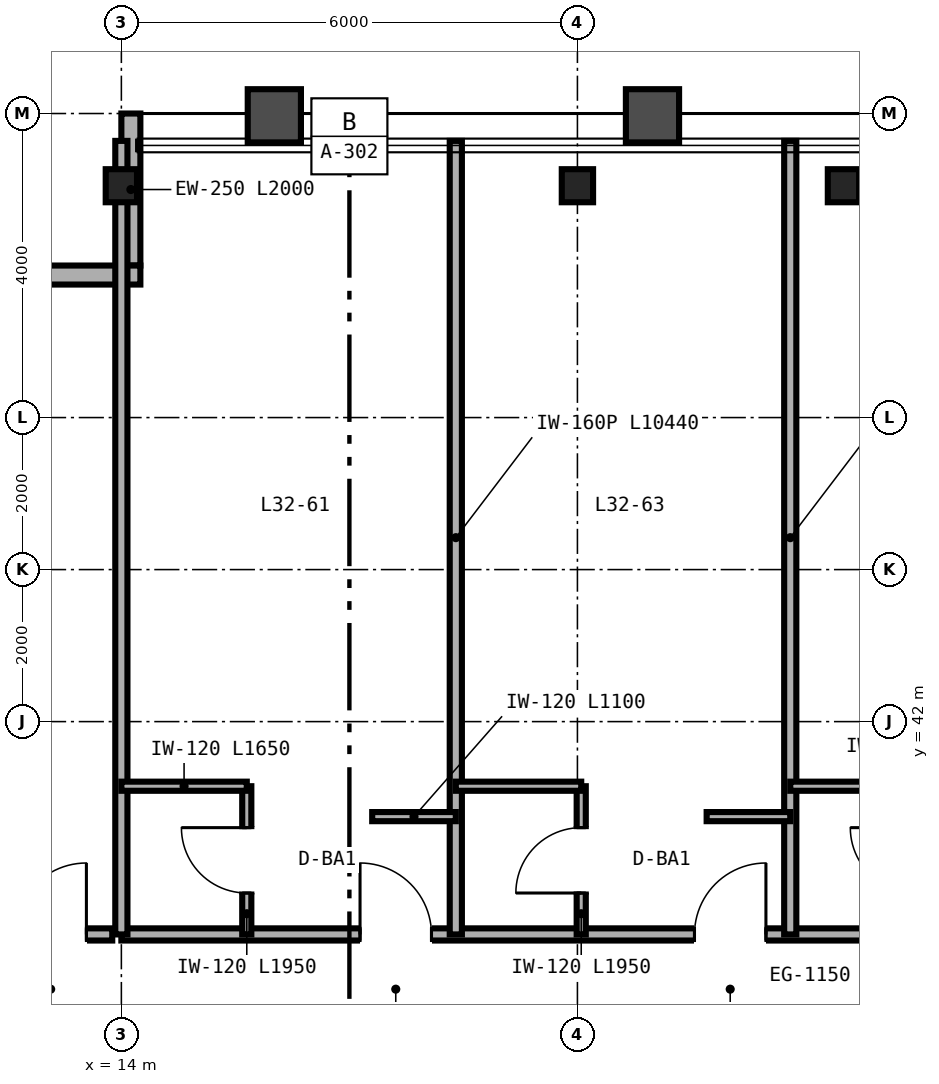
"""IFC4 building model, lengths in metres.
Left out: names, types, materials, properties, quantities, classifications, styles, units other than length and angle.
Written with IfcOpenShell. Run it as: python <this file> out.ifc"""

import sys

from ifc_helpers import new_model, si_unit, direction, frame, frame_2d, origin, origin_2d, place, context, subcontext, project, spatial, rectangle, i_section, extrude, source, transform, mapped, element, fill, save


model = new_model("IFC4")
c1 = context("Model", 3, precision=1e-05, world=origin(), true_north=direction((0.0, 1.0)))
c2 = subcontext(c1, "Body", "Model", "MODEL_VIEW")
j1 = project(units=[si_unit("LENGTHUNIT", "METRE"), si_unit("PLANEANGLEUNIT", "RADIAN")], contexts=[c1])
p1 = place(None, origin())
s1 = spatial("IfcSite", under=j1, at=p1, CompositionType="ELEMENT")
p2 = place(p1, origin())
s2 = spatial("IfcBuilding", under=s1, at=p2, CompositionType="ELEMENT")
p3 = place(p2, frame((0.0, 0.0, 129.6)))
s3 = spatial("IfcBuildingStorey", under=s2, at=p3, CompositionType="ELEMENT", Elevation=129.6)
m1 = source(origin(), c2, "Body", "SweptSolid", [
    extrude(i_section(OverallWidth=0.412, OverallDepth=0.435, WebThickness=0.036, FlangeThickness=0.057, FilletRadius=0.025, at=origin_2d()), origin(), (0.0, 0.0, 1.0), 3.36),
])
for number, where, z_axis, x_axis in (
    (1, (14.0, 49.05, 0.0), (0.0, 0.0, 1.0), (1.0, 0.0, 0.0)),
    (2, (20.0, 49.05, 0.0), (0.0, 0.0, 1.0), (1.0, 0.0, 0.0)),
    (3, (23.5, 49.05, 0.0), (0.0, 0.0, 1.0), (1.0, 0.0, 0.0)),
):
    element("IfcColumn", number, at=place(p3, frame(where, z_axis=z_axis, x_axis=x_axis)), inside=s3, PredefinedType="COLUMN", context=c2, shape_type="MappedRepresentation", body=[
        mapped(m1, transform((0.0, 0.0, 0.0), scale=1.0)),
    ])
p4 = place(p3, frame((14.125, 50.0, 0.0), z_axis=(0.0, 0.0, 1.0), x_axis=(0.0, -1.0, 0.0)))
e4 = element("IfcWall", 4, at=p4, inside=s3, PredefinedType="SOLIDWALL", context=c2, shape_type="SweptSolid", body=[
    extrude(rectangle(XDim=2.0, YDim=0.25, at=frame_2d((1.0, 0.0))), origin(), (0.0, 0.0, 1.0), 2.667),
])
p5 = place(p3, frame((14.25, 47.875, 0.0), z_axis=(0.0, 0.0, 1.0), x_axis=(-1.0, 0.0, 0.0)))
e5 = element("IfcWall", 5, at=p5, inside=s3, PredefinedType="SOLIDWALL", context=c2, shape_type="SweptSolid", body=[
    extrude(rectangle(XDim=2.0, YDim=0.25, at=frame_2d((1.0, 0.0))), origin(), (0.0, 0.0, 1.0), 3.36),
])
p6 = place(p3, frame((8.2, 39.2, 0.0), z_axis=(0.0, 0.0, 1.0), x_axis=(1.0, 0.0, 0.0)))
e6 = element("IfcWall", 6, at=p6, inside=s3, PredefinedType="PARTITIONING", context=c2, shape_type="SweptSolid", body=[
    extrude(rectangle(XDim=5.68, YDim=0.16, at=frame_2d((2.84, 0.0))), origin(), (0.0, 0.0, 1.0), 3.36),
])
p7 = place(p6, frame((4.4, 0.0, 0.0)))
e7 = element("IfcOpeningElement", 7, at=p7, cuts=e6, PredefinedType="OPENING", context=c2, shape_type="SweptSolid", body=[
    extrude(rectangle(XDim=0.94, YDim=2.15, at=frame_2d((0.47, 1.075))), frame((0.0, 0.09, 0.0), z_axis=(0.0, -1.0, 0.0), x_axis=(1.0, 0.0, 0.0)), (0.0, 0.0, 1.0), 0.18),
])
p8 = place(p3, frame((14.0, 39.2, 0.0), z_axis=(0.0, 0.0, 1.0), x_axis=(1.0, 0.0, 0.0)))
e8 = element("IfcWall", 8, at=p8, inside=s3, PredefinedType="PARTITIONING", context=c2, shape_type="SweptSolid", body=[
    extrude(rectangle(XDim=36.0, YDim=0.16, at=frame_2d((18.0, 0.0))), origin(), (0.0, 0.0, 1.0), 2.581),
])
p9 = place(p8, frame((3.14, 0.0, 0.0)))
e9 = element("IfcOpeningElement", 9, at=p9, cuts=e8, PredefinedType="OPENING", context=c2, shape_type="SweptSolid", body=[
    extrude(rectangle(XDim=0.94, YDim=2.15, at=frame_2d((0.47, 1.075))), frame((0.0, 0.09, 0.0), z_axis=(0.0, -1.0, 0.0), x_axis=(1.0, 0.0, 0.0)), (0.0, 0.0, 1.0), 0.18),
])
p10 = place(p8, frame((7.54, 0.0, 0.0)))
e10 = element("IfcOpeningElement", 10, at=p10, cuts=e8, PredefinedType="OPENING", context=c2, shape_type="SweptSolid", body=[
    extrude(rectangle(XDim=0.94, YDim=2.15, at=frame_2d((0.47, 1.075))), frame((0.0, 0.09, 0.0), z_axis=(0.0, -1.0, 0.0), x_axis=(1.0, 0.0, 0.0)), (0.0, 0.0, 1.0), 0.18),
])
p11 = place(p8, frame((11.94, 0.0, 0.0)))
e11 = element("IfcOpeningElement", 11, at=p11, cuts=e8, PredefinedType="OPENING", context=c2, shape_type="SweptSolid", body=[
    extrude(rectangle(XDim=0.94, YDim=2.15, at=frame_2d((0.47, 1.075))), frame((0.0, 0.09, 0.0), z_axis=(0.0, -1.0, 0.0), x_axis=(1.0, 0.0, 0.0)), (0.0, 0.0, 1.0), 0.18),
])
p12 = place(p8, frame((15.02, 0.0, 0.0)))
e12 = element("IfcOpeningElement", 12, at=p12, cuts=e8, PredefinedType="OPENING", context=c2, shape_type="SweptSolid", body=[
    extrude(rectangle(XDim=0.96, YDim=2.15, at=frame_2d((0.48, 1.075))), frame((0.0, 0.09, 0.0), z_axis=(0.0, -1.0, 0.0), x_axis=(1.0, 0.0, 0.0)), (0.0, 0.0, 1.0), 0.18),
])
p13 = place(p8, frame((21.14, 0.0, 0.0)))
e13 = element("IfcOpeningElement", 13, at=p13, cuts=e8, PredefinedType="OPENING", context=c2, shape_type="SweptSolid", body=[
    extrude(rectangle(XDim=0.94, YDim=2.15, at=frame_2d((0.47, 1.075))), frame((0.0, 0.09, 0.0), z_axis=(0.0, -1.0, 0.0), x_axis=(1.0, 0.0, 0.0)), (0.0, 0.0, 1.0), 0.18),
])
p14 = place(p8, frame((24.79, 0.0, 0.0)))
e14 = element("IfcOpeningElement", 14, at=p14, cuts=e8, PredefinedType="OPENING", context=c2, shape_type="SweptSolid", body=[
    extrude(rectangle(XDim=0.94, YDim=2.15, at=frame_2d((0.47, 1.075))), frame((0.0, 0.09, 0.0), z_axis=(0.0, -1.0, 0.0), x_axis=(1.0, 0.0, 0.0)), (0.0, 0.0, 1.0), 0.18),
])
p15 = place(p8, frame((30.24, 0.0, 0.0)))
e15 = element("IfcOpeningElement", 15, at=p15, cuts=e8, PredefinedType="OPENING", context=c2, shape_type="SweptSolid", body=[
    extrude(rectangle(XDim=0.94, YDim=2.15, at=frame_2d((0.47, 1.075))), frame((0.0, 0.09, 0.0), z_axis=(0.0, -1.0, 0.0), x_axis=(1.0, 0.0, 0.0)), (0.0, 0.0, 1.0), 0.18),
])
p16 = place(p8, frame((34.74, 0.0, 0.0)))
e16 = element("IfcOpeningElement", 16, at=p16, cuts=e8, PredefinedType="OPENING", context=c2, shape_type="SweptSolid", body=[
    extrude(rectangle(XDim=0.94, YDim=2.15, at=frame_2d((0.47, 1.075))), frame((0.0, 0.09, 0.0), z_axis=(0.0, -1.0, 0.0), x_axis=(1.0, 0.0, 0.0)), (0.0, 0.0, 1.0), 0.18),
])
for number, where, z_axis, x_axis in (
    (17, (14.0, 39.2, 0.0), (0.0, 0.0, 1.0), (0.0, 1.0, 0.0)),
    (18, (18.4, 39.2, 0.0), (0.0, 0.0, 1.0), (0.0, 1.0, 0.0)),
):
    element("IfcWall", number, at=place(p3, frame(where, z_axis=z_axis, x_axis=x_axis)), inside=s3, PredefinedType="PARTITIONING", context=c2, shape_type="SweptSolid", body=[
        extrude(rectangle(XDim=10.44, YDim=0.16, at=frame_2d((5.22, 0.0))), origin(), (0.0, 0.0, 1.0), 2.667),
    ])
p17 = place(p3, frame((15.65, 39.2, 0.0), z_axis=(0.0, 0.0, 1.0), x_axis=(0.0, 1.0, 0.0)))
e19 = element("IfcWall", 19, at=p17, inside=s3, PredefinedType="PARTITIONING", context=c2, shape_type="SweptSolid", body=[
    extrude(rectangle(XDim=1.95, YDim=0.12, at=frame_2d((0.975, 0.0))), origin(), (0.0, 0.0, 1.0), 3.36),
])
p18 = place(p17, frame((0.545, 0.0, 0.0)))
e20 = element("IfcOpeningElement", 20, at=p18, cuts=e19, PredefinedType="OPENING", context=c2, shape_type="SweptSolid", body=[
    extrude(rectangle(XDim=0.86, YDim=2.1, at=frame_2d((0.43, 1.05))), frame((0.0, 0.07, 0.0), z_axis=(0.0, -1.0, 0.0), x_axis=(1.0, 0.0, 0.0)), (0.0, 0.0, 1.0), 0.14),
])
p19 = place(p3, frame((14.0, 41.15, 0.0), z_axis=(0.0, 0.0, 1.0), x_axis=(1.0, 0.0, 0.0)))
e21 = element("IfcWall", 21, at=p19, inside=s3, PredefinedType="PARTITIONING", context=c2, shape_type="SweptSolid", body=[
    extrude(rectangle(XDim=1.65, YDim=0.12, at=frame_2d((0.825, 0.0))), origin(), (0.0, 0.0, 1.0), 3.36),
])
p20 = place(p3, frame((17.3, 40.75, 0.0), z_axis=(0.0, 0.0, 1.0), x_axis=(1.0, 0.0, 0.0)))
e22 = element("IfcWall", 22, at=p20, inside=s3, PredefinedType="PARTITIONING", context=c2, shape_type="SweptSolid", body=[
    extrude(rectangle(XDim=1.1, YDim=0.12, at=frame_2d((0.55, 0.0))), origin(), (0.0, 0.0, 1.0), 3.36),
])
p21 = place(p3, frame((22.8, 39.2, 0.0), z_axis=(0.0, 0.0, 1.0), x_axis=(0.0, 1.0, 0.0)))
e23 = element("IfcWall", 23, at=p21, inside=s3, PredefinedType="PARTITIONING", context=c2, shape_type="SweptSolid", body=[
    extrude(rectangle(XDim=10.44, YDim=0.16, at=frame_2d((5.22, 0.0))), origin(), (0.0, 0.0, 1.0), 2.823),
])
p22 = place(p3, frame((20.05, 39.2, 0.0), z_axis=(0.0, 0.0, 1.0), x_axis=(0.0, 1.0, 0.0)))
e24 = element("IfcWall", 24, at=p22, inside=s3, PredefinedType="PARTITIONING", context=c2, shape_type="SweptSolid", body=[
    extrude(rectangle(XDim=1.95, YDim=0.12, at=frame_2d((0.975, 0.0))), origin(), (0.0, 0.0, 1.0), 3.36),
])
p23 = place(p22, frame((0.545, 0.0, 0.0)))
e25 = element("IfcOpeningElement", 25, at=p23, cuts=e24, PredefinedType="OPENING", context=c2, shape_type="SweptSolid", body=[
    extrude(rectangle(XDim=0.86, YDim=2.1, at=frame_2d((0.43, 1.05))), frame((0.0, 0.07, 0.0), z_axis=(0.0, -1.0, 0.0), x_axis=(1.0, 0.0, 0.0)), (0.0, 0.0, 1.0), 0.14),
])
p24 = place(p3, frame((18.4, 41.15, 0.0), z_axis=(0.0, 0.0, 1.0), x_axis=(1.0, 0.0, 0.0)))
e26 = element("IfcWall", 26, at=p24, inside=s3, PredefinedType="PARTITIONING", context=c2, shape_type="SweptSolid", body=[
    extrude(rectangle(XDim=1.65, YDim=0.12, at=frame_2d((0.825, 0.0))), origin(), (0.0, 0.0, 1.0), 3.36),
])
p25 = place(p3, frame((21.7, 40.75, 0.0), z_axis=(0.0, 0.0, 1.0), x_axis=(1.0, 0.0, 0.0)))
e27 = element("IfcWall", 27, at=p25, inside=s3, PredefinedType="PARTITIONING", context=c2, shape_type="SweptSolid", body=[
    extrude(rectangle(XDim=1.1, YDim=0.12, at=frame_2d((0.55, 0.0))), origin(), (0.0, 0.0, 1.0), 3.36),
])
p26 = place(p3, frame((22.8, 41.15, 0.0), z_axis=(0.0, 0.0, 1.0), x_axis=(1.0, 0.0, 0.0)))
e28 = element("IfcWall", 28, at=p26, inside=s3, PredefinedType="PARTITIONING", context=c2, shape_type="SweptSolid", body=[
    extrude(rectangle(XDim=1.65, YDim=0.12, at=frame_2d((0.825, 0.0))), origin(), (0.0, 0.0, 1.0), 2.581),
])
m2 = source(origin(), c2, "Body", "SweptSolid", [
    extrude(rectangle(XDim=0.94, YDim=2.15, at=frame_2d((0.47, 1.075))), frame((0.0, 0.025, 0.0), z_axis=(0.0, -1.0, 0.0), x_axis=(1.0, 0.0, 0.0)), (0.0, 0.0, 1.0), 0.05),
])
p27 = place(p7, origin())
e29 = element("IfcDoor", 29, at=p27, inside=s3, OperationType="SINGLE_SWING_RIGHT", PredefinedType="DOOR", context=c2, shape_type="MappedRepresentation", body=[
    mapped(m2, transform((0.0, 0.0, 0.0), scale=1.0)),
])
fill(e7, e29)
m3 = source(origin(), c2, "Body", "SweptSolid", [
    extrude(rectangle(XDim=0.86, YDim=2.1, at=frame_2d((0.43, 1.05))), frame((0.0, 0.025, 0.0), z_axis=(0.0, -1.0, 0.0), x_axis=(1.0, 0.0, 0.0)), (0.0, 0.0, 1.0), 0.05),
])
p28 = place(p18, origin())
e30 = element("IfcDoor", 30, at=p28, inside=s3, OperationType="SINGLE_SWING_RIGHT", PredefinedType="DOOR", context=c2, shape_type="MappedRepresentation", body=[
    mapped(m3, transform((0.0, 0.0, 0.0), scale=1.0)),
])
fill(e20, e30)
p29 = place(p23, origin())
e31 = element("IfcDoor", 31, at=p29, inside=s3, OperationType="SINGLE_SWING_LEFT", PredefinedType="DOOR", context=c2, shape_type="MappedRepresentation", body=[
    mapped(m3, transform((0.0, 0.0, 0.0), scale=1.0)),
])
fill(e25, e31)
p30 = place(p9, origin())
e32 = element("IfcDoor", 32, at=p30, inside=s3, OperationType="SINGLE_SWING_LEFT", PredefinedType="DOOR", context=c2, shape_type="MappedRepresentation", body=[
    mapped(m2, transform((0.0, 0.0, 0.0), scale=1.0)),
])
fill(e9, e32)
p31 = place(p10, origin())
e33 = element("IfcDoor", 33, at=p31, inside=s3, OperationType="SINGLE_SWING_RIGHT", PredefinedType="DOOR", context=c2, shape_type="MappedRepresentation", body=[
    mapped(m2, transform((0.0, 0.0, 0.0), scale=1.0)),
])
fill(e10, e33)
save(model, sys.argv[1])
